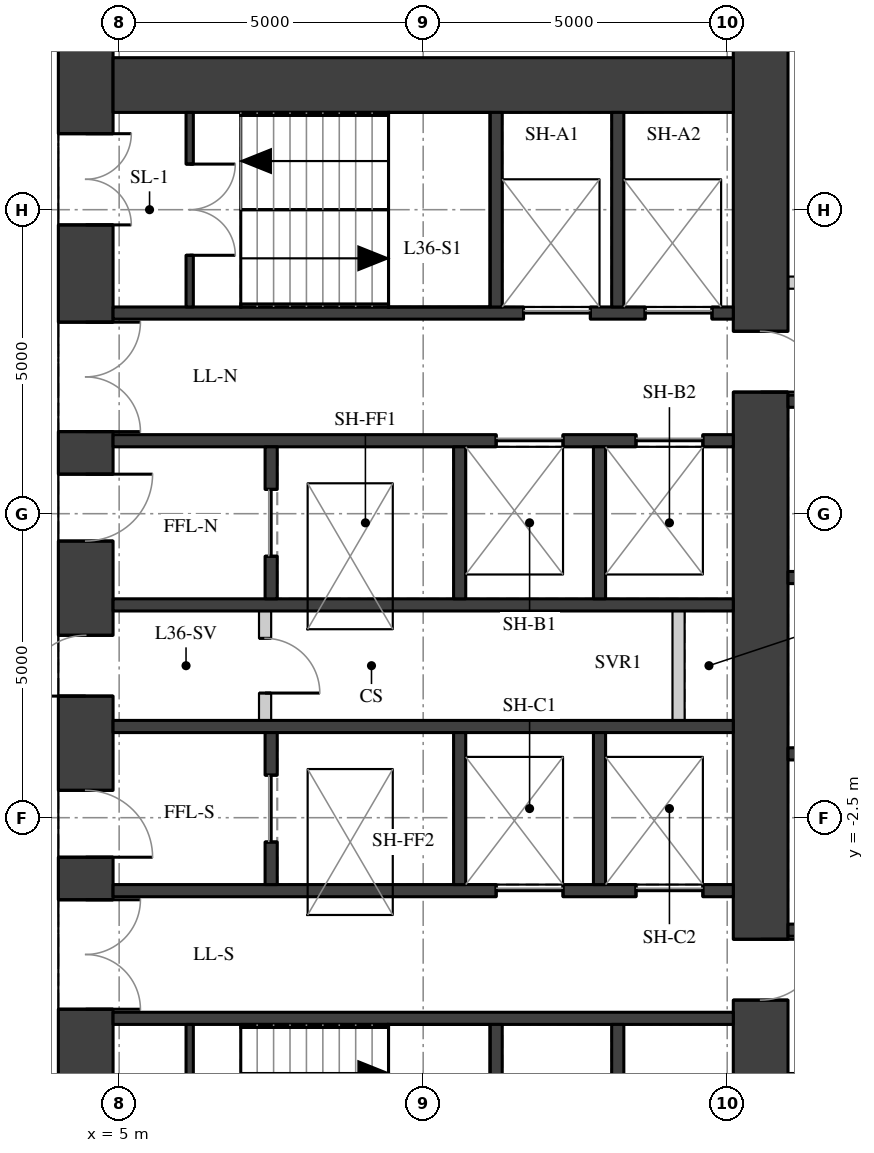
"""IFC4 building model, lengths in metres.
Left out: names, types, materials, properties, quantities, classifications, styles, units other than length and angle.
Written with IfcOpenShell. Run it as: python <this file> out.ifc"""

import sys

from ifc_helpers import new_model, si_unit, direction, frame, frame_2d, origin, place, context, subcontext, project, spatial, rectangle, extrude, element, fill, save


model = new_model("IFC4")
c1 = context("Model", 3, precision=1e-05, world=origin(), true_north=direction((0.0, 1.0)))
c2 = subcontext(c1, "Body", "Model", "MODEL_VIEW")
j1 = project(units=[si_unit("LENGTHUNIT", "METRE"), si_unit("PLANEANGLEUNIT", "RADIAN")], contexts=[c1])
p1 = place(None, origin())
s1 = spatial("IfcSite", under=j1, at=p1, CompositionType="ELEMENT")
p2 = place(p1, origin())
s2 = spatial("IfcBuilding", under=s1, at=p2, CompositionType="ELEMENT")
p3 = place(p2, frame((0.0, 0.0, 128.5)))
s3 = spatial("IfcBuildingStorey", under=s2, at=p3, CompositionType="ELEMENT", Elevation=128.5)
p4 = place(p3, frame((4.45, -11.1, 0.0), z_axis=(0.0, 0.0, 1.0), x_axis=(0.0, 1.0, 0.0)))
e1 = element("IfcWall", 1, at=p4, inside=s3, PredefinedType="SHEAR", context=c2, shape_type="SweptSolid", body=[
    extrude(rectangle(XDim=22.2, YDim=0.9, at=frame_2d((11.1, 0.0))), origin(), (0.0, 0.0, 1.0), 3.02),
])
p5 = place(p4, frame((2.35, 0.0, 0.0)))
e2 = element("IfcOpeningElement", 2, at=p5, cuts=e1, PredefinedType="OPENING", context=c2, shape_type="SweptSolid", body=[
    extrude(rectangle(XDim=1.5, YDim=2.1, at=frame_2d((0.75, 1.05))), frame((0.0, 0.46, 0.0), z_axis=(0.0, -1.0, 0.0), x_axis=(1.0, 0.0, 0.0)), (0.0, 0.0, 1.0), 0.92),
])
p6 = place(p4, frame((5.45, 0.0, 0.0)))
e3 = element("IfcOpeningElement", 3, at=p6, cuts=e1, PredefinedType="OPENING", context=c2, shape_type="SweptSolid", body=[
    extrude(rectangle(XDim=1.8, YDim=2.1, at=frame_2d((0.9, 1.05))), frame((0.0, 0.46, 0.0), z_axis=(0.0, -1.0, 0.0), x_axis=(1.0, 0.0, 0.0)), (0.0, 0.0, 1.0), 0.92),
])
p7 = place(p4, frame((7.95, 0.0, 0.0)))
e4 = element("IfcOpeningElement", 4, at=p7, cuts=e1, PredefinedType="OPENING", context=c2, shape_type="SweptSolid", body=[
    extrude(rectangle(XDim=1.1, YDim=2.1, at=frame_2d((0.55, 1.05))), frame((0.0, 0.46, 0.0), z_axis=(0.0, -1.0, 0.0), x_axis=(1.0, 0.0, 0.0)), (0.0, 0.0, 1.0), 0.92),
])
p8 = place(p4, frame((10.6, 0.0, 0.0)))
e5 = element("IfcOpeningElement", 5, at=p8, cuts=e1, PredefinedType="OPENING", context=c2, shape_type="SweptSolid", body=[
    extrude(rectangle(XDim=1.0, YDim=2.1, at=frame_2d((0.5, 1.05))), frame((0.0, 0.46, 0.0), z_axis=(0.0, -1.0, 0.0), x_axis=(1.0, 0.0, 0.0)), (0.0, 0.0, 1.0), 0.92),
])
p9 = place(p4, frame((13.15, 0.0, 0.0)))
e6 = element("IfcOpeningElement", 6, at=p9, cuts=e1, PredefinedType="OPENING", context=c2, shape_type="SweptSolid", body=[
    extrude(rectangle(XDim=1.1, YDim=2.1, at=frame_2d((0.55, 1.05))), frame((0.0, 0.46, 0.0), z_axis=(0.0, -1.0, 0.0), x_axis=(1.0, 0.0, 0.0)), (0.0, 0.0, 1.0), 0.92),
])
p10 = place(p4, frame((14.95, 0.0, 0.0)))
e7 = element("IfcOpeningElement", 7, at=p10, cuts=e1, PredefinedType="OPENING", context=c2, shape_type="SweptSolid", body=[
    extrude(rectangle(XDim=1.8, YDim=2.1, at=frame_2d((0.9, 1.05))), frame((0.0, 0.46, 0.0), z_axis=(0.0, -1.0, 0.0), x_axis=(1.0, 0.0, 0.0)), (0.0, 0.0, 1.0), 0.92),
])
p11 = place(p4, frame((18.35, 0.0, 0.0)))
e8 = element("IfcOpeningElement", 8, at=p11, cuts=e1, PredefinedType="OPENING", context=c2, shape_type="SweptSolid", body=[
    extrude(rectangle(XDim=1.5, YDim=2.1, at=frame_2d((0.75, 1.05))), frame((0.0, 0.46, 0.0), z_axis=(0.0, -1.0, 0.0), x_axis=(1.0, 0.0, 0.0)), (0.0, 0.0, 1.0), 0.92),
])
p12 = place(p3, frame((15.55, -11.1, 0.0), z_axis=(0.0, 0.0, 1.0), x_axis=(0.0, 1.0, 0.0)))
e9 = element("IfcWall", 9, at=p12, inside=s3, PredefinedType="SHEAR", context=c2, shape_type="SweptSolid", body=[
    extrude(rectangle(XDim=22.2, YDim=0.9, at=frame_2d((11.1, 0.0))), origin(), (0.0, 0.0, 1.0), 3.02),
])
p13 = place(p12, frame((15.6, 0.0, 0.0)))
e10 = element("IfcOpeningElement", 10, at=p13, cuts=e9, PredefinedType="OPENING", context=c2, shape_type="SweptSolid", body=[
    extrude(rectangle(XDim=1.0, YDim=2.1, at=frame_2d((0.5, 1.05))), frame((0.0, 0.46, 0.0), z_axis=(0.0, -1.0, 0.0), x_axis=(1.0, 0.0, 0.0)), (0.0, 0.0, 1.0), 0.92),
])
p14 = place(p12, frame((5.6, 0.0, 0.0)))
e11 = element("IfcOpeningElement", 11, at=p14, cuts=e9, PredefinedType="OPENING", context=c2, shape_type="SweptSolid", body=[
    extrude(rectangle(XDim=1.0, YDim=2.1, at=frame_2d((0.5, 1.05))), frame((0.0, 0.46, 0.0), z_axis=(0.0, -1.0, 0.0), x_axis=(1.0, 0.0, 0.0)), (0.0, 0.0, 1.0), 0.92),
])
p15 = place(p3, frame((4.9, 9.55, 0.0), z_axis=(0.0, 0.0, 1.0), x_axis=(1.0, 0.0, 0.0)))
e12 = element("IfcWall", 12, at=p15, inside=s3, PredefinedType="SHEAR", context=c2, shape_type="SweptSolid", body=[
    extrude(rectangle(XDim=10.2, YDim=0.9, at=frame_2d((5.1, 0.0))), origin(), (0.0, 0.0, 1.0), 3.02),
])
p16 = place(p3, frame((4.9, 5.8, 0.0), z_axis=(0.0, 0.0, 1.0), x_axis=(1.0, 0.0, 0.0)))
e13 = element("IfcWall", 13, at=p16, inside=s3, PredefinedType="SHEAR", context=c2, shape_type="SweptSolid", body=[
    extrude(rectangle(XDim=10.2, YDim=0.2, at=frame_2d((5.1, 0.0))), origin(), (0.0, 0.0, 1.0), 3.02),
])
p17 = place(p16, frame((6.75, 0.0, 0.0)))
e14 = element("IfcOpeningElement", 14, at=p17, cuts=e13, PredefinedType="OPENING", context=c2, shape_type="SweptSolid", body=[
    extrude(rectangle(XDim=1.1, YDim=2.1, at=frame_2d((0.55, 1.05))), frame((0.0, 0.11, 0.0), z_axis=(0.0, -1.0, 0.0), x_axis=(1.0, 0.0, 0.0)), (0.0, 0.0, 1.0), 0.22),
])
p18 = place(p16, frame((8.75, 0.0, 0.0)))
e15 = element("IfcOpeningElement", 15, at=p18, cuts=e13, PredefinedType="OPENING", context=c2, shape_type="SweptSolid", body=[
    extrude(rectangle(XDim=1.1, YDim=2.1, at=frame_2d((0.55, 1.05))), frame((0.0, 0.11, 0.0), z_axis=(0.0, -1.0, 0.0), x_axis=(1.0, 0.0, 0.0)), (0.0, 0.0, 1.0), 0.22),
])
p19 = place(p3, frame((4.9, 3.7, 0.0), z_axis=(0.0, 0.0, 1.0), x_axis=(1.0, 0.0, 0.0)))
e16 = element("IfcWall", 16, at=p19, inside=s3, PredefinedType="SHEAR", context=c2, shape_type="SweptSolid", body=[
    extrude(rectangle(XDim=10.2, YDim=0.2, at=frame_2d((5.1, 0.0))), origin(), (0.0, 0.0, 1.0), 3.02),
])
p20 = place(p19, frame((6.3, 0.0, 0.0)))
e17 = element("IfcOpeningElement", 17, at=p20, cuts=e16, PredefinedType="OPENING", context=c2, shape_type="SweptSolid", body=[
    extrude(rectangle(XDim=1.1, YDim=2.1, at=frame_2d((0.55, 1.05))), frame((0.0, 0.11, 0.0), z_axis=(0.0, -1.0, 0.0), x_axis=(1.0, 0.0, 0.0)), (0.0, 0.0, 1.0), 0.22),
])
p21 = place(p19, frame((8.6, 0.0, 0.0)))
e18 = element("IfcOpeningElement", 18, at=p21, cuts=e16, PredefinedType="OPENING", context=c2, shape_type="SweptSolid", body=[
    extrude(rectangle(XDim=1.1, YDim=2.1, at=frame_2d((0.55, 1.05))), frame((0.0, 0.11, 0.0), z_axis=(0.0, -1.0, 0.0), x_axis=(1.0, 0.0, 0.0)), (0.0, 0.0, 1.0), 0.22),
])
for number, where, z_axis, x_axis in (
    (19, (4.9, 1.0, 0.0), (0.0, 0.0, 1.0), (1.0, 0.0, 0.0)),
    (20, (4.9, -1.0, 0.0), (0.0, 0.0, 1.0), (1.0, 0.0, 0.0)),
):
    element("IfcWall", number, at=place(p3, frame(where, z_axis=z_axis, x_axis=x_axis)), inside=s3, PredefinedType="SHEAR", context=c2, shape_type="SweptSolid", body=[
        extrude(rectangle(XDim=10.2, YDim=0.2, at=frame_2d((5.1, 0.0))), origin(), (0.0, 0.0, 1.0), 3.02),
    ])
p22 = place(p3, frame((4.9, -3.7, 0.0), z_axis=(0.0, 0.0, 1.0), x_axis=(1.0, 0.0, 0.0)))
e21 = element("IfcWall", 21, at=p22, inside=s3, PredefinedType="SHEAR", context=c2, shape_type="SweptSolid", body=[
    extrude(rectangle(XDim=10.2, YDim=0.2, at=frame_2d((5.1, 0.0))), origin(), (0.0, 0.0, 1.0), 3.02),
])
p23 = place(p22, frame((6.3, 0.0, 0.0)))
e22 = element("IfcOpeningElement", 22, at=p23, cuts=e21, PredefinedType="OPENING", context=c2, shape_type="SweptSolid", body=[
    extrude(rectangle(XDim=1.1, YDim=2.1, at=frame_2d((0.55, 1.05))), frame((0.0, 0.11, 0.0), z_axis=(0.0, -1.0, 0.0), x_axis=(1.0, 0.0, 0.0)), (0.0, 0.0, 1.0), 0.22),
])
p24 = place(p22, frame((8.6, 0.0, 0.0)))
e23 = element("IfcOpeningElement", 23, at=p24, cuts=e21, PredefinedType="OPENING", context=c2, shape_type="SweptSolid", body=[
    extrude(rectangle(XDim=1.1, YDim=2.1, at=frame_2d((0.55, 1.05))), frame((0.0, 0.11, 0.0), z_axis=(0.0, -1.0, 0.0), x_axis=(1.0, 0.0, 0.0)), (0.0, 0.0, 1.0), 0.22),
])
p25 = place(p3, frame((4.9, -5.8, 0.0), z_axis=(0.0, 0.0, 1.0), x_axis=(1.0, 0.0, 0.0)))
e24 = element("IfcWall", 24, at=p25, inside=s3, PredefinedType="SHEAR", context=c2, shape_type="SweptSolid", body=[
    extrude(rectangle(XDim=10.2, YDim=0.2, at=frame_2d((5.1, 0.0))), origin(), (0.0, 0.0, 1.0), 3.02),
])
for number, where, z_axis, x_axis in (
    (25, (11.2, 5.9, 0.0), (0.0, 0.0, 1.0), (0.0, 1.0, 0.0)),
    (26, (11.2, -9.1, 0.0), (0.0, 0.0, 1.0), (0.0, 1.0, 0.0)),
    (27, (13.2, 5.9, 0.0), (0.0, 0.0, 1.0), (0.0, 1.0, 0.0)),
    (28, (13.2, -9.1, 0.0), (0.0, 0.0, 1.0), (0.0, 1.0, 0.0)),
):
    element("IfcWall", number, at=place(p3, frame(where, z_axis=z_axis, x_axis=x_axis)), inside=s3, PredefinedType="SHEAR", context=c2, shape_type="SweptSolid", body=[
        extrude(rectangle(XDim=3.2, YDim=0.2, at=frame_2d((1.6, 0.0))), origin(), (0.0, 0.0, 1.0), 3.02),
    ])
p26 = place(p3, frame((7.5, 1.1, 0.0), z_axis=(0.0, 0.0, 1.0), x_axis=(0.0, 1.0, 0.0)))
e29 = element("IfcWall", 29, at=p26, inside=s3, PredefinedType="SHEAR", context=c2, shape_type="SweptSolid", body=[
    extrude(rectangle(XDim=2.5, YDim=0.2, at=frame_2d((1.25, 0.0))), origin(), (0.0, 0.0, 1.0), 3.02),
])
p27 = place(p26, frame((0.7, 0.0, 0.0)))
e30 = element("IfcOpeningElement", 30, at=p27, cuts=e29, PredefinedType="OPENING", context=c2, shape_type="SweptSolid", body=[
    extrude(rectangle(XDim=1.1, YDim=2.1, at=frame_2d((0.55, 1.05))), frame((0.0, 0.11, 0.0), z_axis=(0.0, -1.0, 0.0), x_axis=(1.0, 0.0, 0.0)), (0.0, 0.0, 1.0), 0.22),
])
p28 = place(p3, frame((7.5, -3.6, 0.0), z_axis=(0.0, 0.0, 1.0), x_axis=(0.0, 1.0, 0.0)))
e31 = element("IfcWall", 31, at=p28, inside=s3, PredefinedType="SHEAR", context=c2, shape_type="SweptSolid", body=[
    extrude(rectangle(XDim=2.5, YDim=0.2, at=frame_2d((1.25, 0.0))), origin(), (0.0, 0.0, 1.0), 3.02),
])
p29 = place(p28, frame((0.7, 0.0, 0.0)))
e32 = element("IfcOpeningElement", 32, at=p29, cuts=e31, PredefinedType="OPENING", context=c2, shape_type="SweptSolid", body=[
    extrude(rectangle(XDim=1.1, YDim=2.1, at=frame_2d((0.55, 1.05))), frame((0.0, 0.11, 0.0), z_axis=(0.0, -1.0, 0.0), x_axis=(1.0, 0.0, 0.0)), (0.0, 0.0, 1.0), 0.22),
])
for number, where, z_axis, x_axis in (
    (33, (10.6, 1.1, 0.0), (0.0, 0.0, 1.0), (0.0, 1.0, 0.0)),
    (34, (10.6, -3.6, 0.0), (0.0, 0.0, 1.0), (0.0, 1.0, 0.0)),
    (35, (12.9, 1.1, 0.0), (0.0, 0.0, 1.0), (0.0, 1.0, 0.0)),
    (36, (12.9, -3.6, 0.0), (0.0, 0.0, 1.0), (0.0, 1.0, 0.0)),
):
    element("IfcWall", number, at=place(p3, frame(where, z_axis=z_axis, x_axis=x_axis)), inside=s3, PredefinedType="SHEAR", context=c2, shape_type="SweptSolid", body=[
        extrude(rectangle(XDim=2.5, YDim=0.2, at=frame_2d((1.25, 0.0))), origin(), (0.0, 0.0, 1.0), 3.02),
    ])
p30 = place(p3, frame((6.16, 5.9, 0.0), z_axis=(0.0, 0.0, 1.0), x_axis=(0.0, 1.0, 0.0)))
e37 = element("IfcWall", 37, at=p30, inside=s3, PredefinedType="SHEAR", context=c2, shape_type="SweptSolid", body=[
    extrude(rectangle(XDim=3.2, YDim=0.12, at=frame_2d((1.6, 0.0))), origin(), (0.0, 0.0, 1.0), 3.02),
])
p31 = place(p30, frame((0.85, 0.0, 0.0)))
e38 = element("IfcOpeningElement", 38, at=p31, cuts=e37, PredefinedType="OPENING", context=c2, shape_type="SweptSolid", body=[
    extrude(rectangle(XDim=1.5, YDim=2.1, at=frame_2d((0.75, 1.05))), frame((0.0, 0.07, 0.0), z_axis=(0.0, -1.0, 0.0), x_axis=(1.0, 0.0, 0.0)), (0.0, 0.0, 1.0), 0.14),
])
p32 = place(p3, frame((6.16, -9.1, 0.0), z_axis=(0.0, 0.0, 1.0), x_axis=(0.0, 1.0, 0.0)))
e39 = element("IfcWall", 39, at=p32, inside=s3, PredefinedType="SHEAR", context=c2, shape_type="SweptSolid", body=[
    extrude(rectangle(XDim=3.2, YDim=0.12, at=frame_2d((1.6, 0.0))), origin(), (0.0, 0.0, 1.0), 3.02),
])
p33 = place(p32, frame((0.85, 0.0, 0.0)))
e40 = element("IfcOpeningElement", 40, at=p33, cuts=e39, PredefinedType="OPENING", context=c2, shape_type="SweptSolid", body=[
    extrude(rectangle(XDim=1.5, YDim=2.1, at=frame_2d((0.75, 1.05))), frame((0.0, 0.07, 0.0), z_axis=(0.0, -1.0, 0.0), x_axis=(1.0, 0.0, 0.0)), (0.0, 0.0, 1.0), 0.14),
])
p34 = place(p3, frame((7.4, -0.9, 0.0), z_axis=(0.0, 0.0, 1.0), x_axis=(0.0, 1.0, 0.0)))
e41 = element("IfcWall", 41, at=p34, inside=s3, PredefinedType="PARTITIONING", context=c2, shape_type="SweptSolid", body=[
    extrude(rectangle(XDim=1.8, YDim=0.2, at=frame_2d((0.9, 0.0))), origin(), (0.0, 0.0, 1.0), 3.02),
])
p35 = place(p34, frame((0.45, 0.0, 0.0)))
e42 = element("IfcOpeningElement", 42, at=p35, cuts=e41, PredefinedType="OPENING", context=c2, shape_type="SweptSolid", body=[
    extrude(rectangle(XDim=0.9, YDim=2.1, at=frame_2d((0.45, 1.05))), frame((0.0, 0.11, 0.0), z_axis=(0.0, -1.0, 0.0), x_axis=(1.0, 0.0, 0.0)), (0.0, 0.0, 1.0), 0.22),
])
p36 = place(p3, frame((14.2, -0.9, 0.0), z_axis=(0.0, 0.0, 1.0), x_axis=(0.0, 1.0, 0.0)))
e43 = element("IfcWall", 43, at=p36, inside=s3, PredefinedType="PARTITIONING", context=c2, shape_type="SweptSolid", body=[
    extrude(rectangle(XDim=1.8, YDim=0.2, at=frame_2d((0.9, 0.0))), origin(), (0.0, 0.0, 1.0), 3.02),
])
for number, where, z_axis, x_axis in (
    (44, (16.0, -4.35, 0.0), (0.0, 0.0, 1.0), (1.0, 0.0, 0.0)),
    (45, (16.0, -1.45, 0.0), (0.0, 0.0, 1.0), (1.0, 0.0, 0.0)),
    (46, (16.0, 1.45, 0.0), (0.0, 0.0, 1.0), (1.0, 0.0, 0.0)),
    (47, (16.0, 4.35, 0.0), (0.0, 0.0, 1.0), (1.0, 0.0, 0.0)),
):
    element("IfcWall", number, at=place(p3, frame(where, z_axis=z_axis, x_axis=x_axis)), inside=s3, PredefinedType="SHEAR", context=c2, shape_type="SweptSolid", body=[
        extrude(rectangle(XDim=2.3, YDim=0.2, at=frame_2d((1.15, 0.0))), origin(), (0.0, 0.0, 1.0), 3.02),
    ])
p37 = place(p3, frame((16.0, 6.3, 0.0), z_axis=(0.0, 0.0, 1.0), x_axis=(1.0, 0.0, 0.0)))
e48 = element("IfcWall", 48, at=p37, inside=s3, PredefinedType="PARTITIONING", context=c2, shape_type="SweptSolid", body=[
    extrude(rectangle(XDim=2.3, YDim=0.2, at=frame_2d((1.15, 0.0))), origin(), (0.0, 0.0, 1.0), 3.02),
])
p38 = place(p37, frame((0.3, 0.0, 0.0)))
e49 = element("IfcOpeningElement", 49, at=p38, cuts=e48, PredefinedType="OPENING", context=c2, shape_type="SweptSolid", body=[
    extrude(rectangle(XDim=0.9, YDim=2.1, at=frame_2d((0.45, 1.05))), frame((0.0, 0.11, 0.0), z_axis=(0.0, -1.0, 0.0), x_axis=(1.0, 0.0, 0.0)), (0.0, 0.0, 1.0), 0.22),
])
p39 = place(p6, origin())
e50 = element("IfcDoor", 50, at=p39, inside=s3, OperationType="DOUBLE_DOOR_SINGLE_SWING", PredefinedType="DOOR", context=c2, shape_type="SweptSolid", body=[
    extrude(rectangle(XDim=1.8, YDim=2.1, at=frame_2d((0.9, 1.05))), frame((0.0, 0.025, 0.0), z_axis=(0.0, -1.0, 0.0), x_axis=(1.0, 0.0, 0.0)), (0.0, 0.0, 1.0), 0.05),
])
fill(e3, e50)
p40 = place(p7, origin())
e51 = element("IfcDoor", 51, at=p40, inside=s3, OperationType="SINGLE_SWING_RIGHT", PredefinedType="DOOR", context=c2, shape_type="SweptSolid", body=[
    extrude(rectangle(XDim=1.1, YDim=2.1, at=frame_2d((0.55, 1.05))), frame((0.0, 0.025, 0.0), z_axis=(0.0, -1.0, 0.0), x_axis=(1.0, 0.0, 0.0)), (0.0, 0.0, 1.0), 0.05),
])
fill(e4, e51)
p41 = place(p8, origin())
e52 = element("IfcDoor", 52, at=p41, inside=s3, OperationType="SINGLE_SWING_LEFT", PredefinedType="DOOR", context=c2, shape_type="SweptSolid", body=[
    extrude(rectangle(XDim=1.0, YDim=2.1, at=frame_2d((0.5, 1.05))), frame((0.0, 0.025, 0.0), z_axis=(0.0, -1.0, 0.0), x_axis=(1.0, 0.0, 0.0)), (0.0, 0.0, 1.0), 0.05),
])
fill(e5, e52)
p42 = place(p9, origin())
e53 = element("IfcDoor", 53, at=p42, inside=s3, OperationType="SINGLE_SWING_LEFT", PredefinedType="DOOR", context=c2, shape_type="SweptSolid", body=[
    extrude(rectangle(XDim=1.1, YDim=2.1, at=frame_2d((0.55, 1.05))), frame((0.0, 0.025, 0.0), z_axis=(0.0, -1.0, 0.0), x_axis=(1.0, 0.0, 0.0)), (0.0, 0.0, 1.0), 0.05),
])
fill(e6, e53)
p43 = place(p10, origin())
e54 = element("IfcDoor", 54, at=p43, inside=s3, OperationType="DOUBLE_DOOR_SINGLE_SWING", PredefinedType="DOOR", context=c2, shape_type="SweptSolid", body=[
    extrude(rectangle(XDim=1.8, YDim=2.1, at=frame_2d((0.9, 1.05))), frame((0.0, 0.025, 0.0), z_axis=(0.0, -1.0, 0.0), x_axis=(1.0, 0.0, 0.0)), (0.0, 0.0, 1.0), 0.05),
])
fill(e7, e54)
p44 = place(p11, origin())
e55 = element("IfcDoor", 55, at=p44, inside=s3, OperationType="DOUBLE_DOOR_SINGLE_SWING", PredefinedType="DOOR", context=c2, shape_type="SweptSolid", body=[
    extrude(rectangle(XDim=1.5, YDim=2.1, at=frame_2d((0.75, 1.05))), frame((0.0, 0.025, 0.0), z_axis=(0.0, -1.0, 0.0), x_axis=(1.0, 0.0, 0.0)), (0.0, 0.0, 1.0), 0.05),
])
fill(e8, e55)
p45 = place(p31, origin())
e56 = element("IfcDoor", 56, at=p45, inside=s3, OperationType="DOUBLE_DOOR_SINGLE_SWING", PredefinedType="DOOR", context=c2, shape_type="SweptSolid", body=[
    extrude(rectangle(XDim=1.5, YDim=2.1, at=frame_2d((0.75, 1.05))), frame((0.0, 0.025, 0.0), z_axis=(0.0, -1.0, 0.0), x_axis=(1.0, 0.0, 0.0)), (0.0, 0.0, 1.0), 0.05),
])
fill(e38, e56)
p46 = place(p17, origin())
e57 = element("IfcDoor", 57, at=p46, inside=s3, OperationType="DOUBLE_DOOR_SLIDING", PredefinedType="DOOR", context=c2, shape_type="SweptSolid", body=[
    extrude(rectangle(XDim=1.1, YDim=2.1, at=frame_2d((0.55, 1.05))), frame((0.0, 0.025, 0.0), z_axis=(0.0, -1.0, 0.0), x_axis=(1.0, 0.0, 0.0)), (0.0, 0.0, 1.0), 0.05),
])
fill(e14, e57)
p47 = place(p18, origin())
e58 = element("IfcDoor", 58, at=p47, inside=s3, OperationType="DOUBLE_DOOR_SLIDING", PredefinedType="DOOR", context=c2, shape_type="SweptSolid", body=[
    extrude(rectangle(XDim=1.1, YDim=2.1, at=frame_2d((0.55, 1.05))), frame((0.0, 0.025, 0.0), z_axis=(0.0, -1.0, 0.0), x_axis=(1.0, 0.0, 0.0)), (0.0, 0.0, 1.0), 0.05),
])
fill(e15, e58)
p48 = place(p20, origin())
e59 = element("IfcDoor", 59, at=p48, inside=s3, OperationType="DOUBLE_DOOR_SLIDING", PredefinedType="DOOR", context=c2, shape_type="SweptSolid", body=[
    extrude(rectangle(XDim=1.1, YDim=2.1, at=frame_2d((0.55, 1.05))), frame((0.0, 0.025, 0.0), z_axis=(0.0, -1.0, 0.0), x_axis=(1.0, 0.0, 0.0)), (0.0, 0.0, 1.0), 0.05),
])
fill(e17, e59)
p49 = place(p21, origin())
e60 = element("IfcDoor", 60, at=p49, inside=s3, OperationType="DOUBLE_DOOR_SLIDING", PredefinedType="DOOR", context=c2, shape_type="SweptSolid", body=[
    extrude(rectangle(XDim=1.1, YDim=2.1, at=frame_2d((0.55, 1.05))), frame((0.0, 0.025, 0.0), z_axis=(0.0, -1.0, 0.0), x_axis=(1.0, 0.0, 0.0)), (0.0, 0.0, 1.0), 0.05),
])
fill(e18, e60)
p50 = place(p23, origin())
e61 = element("IfcDoor", 61, at=p50, inside=s3, OperationType="DOUBLE_DOOR_SLIDING", PredefinedType="DOOR", context=c2, shape_type="SweptSolid", body=[
    extrude(rectangle(XDim=1.1, YDim=2.1, at=frame_2d((0.55, 1.05))), frame((0.0, 0.025, 0.0), z_axis=(0.0, -1.0, 0.0), x_axis=(1.0, 0.0, 0.0)), (0.0, 0.0, 1.0), 0.05),
])
fill(e22, e61)
p51 = place(p24, origin())
e62 = element("IfcDoor", 62, at=p51, inside=s3, OperationType="DOUBLE_DOOR_SLIDING", PredefinedType="DOOR", context=c2, shape_type="SweptSolid", body=[
    extrude(rectangle(XDim=1.1, YDim=2.1, at=frame_2d((0.55, 1.05))), frame((0.0, 0.025, 0.0), z_axis=(0.0, -1.0, 0.0), x_axis=(1.0, 0.0, 0.0)), (0.0, 0.0, 1.0), 0.05),
])
fill(e23, e62)
p52 = place(p27, origin())
e63 = element("IfcDoor", 63, at=p52, inside=s3, OperationType="DOUBLE_DOOR_SLIDING", PredefinedType="DOOR", context=c2, shape_type="SweptSolid", body=[
    extrude(rectangle(XDim=1.1, YDim=2.1, at=frame_2d((0.55, 1.05))), frame((0.0, 0.025, 0.0), z_axis=(0.0, -1.0, 0.0), x_axis=(1.0, 0.0, 0.0)), (0.0, 0.0, 1.0), 0.05),
])
fill(e30, e63)
p53 = place(p29, origin())
e64 = element("IfcDoor", 64, at=p53, inside=s3, OperationType="DOUBLE_DOOR_SLIDING", PredefinedType="DOOR", context=c2, shape_type="SweptSolid", body=[
    extrude(rectangle(XDim=1.1, YDim=2.1, at=frame_2d((0.55, 1.05))), frame((0.0, 0.025, 0.0), z_axis=(0.0, -1.0, 0.0), x_axis=(1.0, 0.0, 0.0)), (0.0, 0.0, 1.0), 0.05),
])
fill(e32, e64)
p54 = place(p35, origin())
e65 = element("IfcDoor", 65, at=p54, inside=s3, OperationType="SINGLE_SWING_RIGHT", PredefinedType="DOOR", context=c2, shape_type="SweptSolid", body=[
    extrude(rectangle(XDim=0.9, YDim=2.1, at=frame_2d((0.45, 1.05))), frame((0.0, 0.025, 0.0), z_axis=(0.0, -1.0, 0.0), x_axis=(1.0, 0.0, 0.0)), (0.0, 0.0, 1.0), 0.05),
])
fill(e42, e65)
p55 = place(p13, origin())
e66 = element("IfcDoor", 66, at=p55, inside=s3, OperationType="SINGLE_SWING_RIGHT", PredefinedType="DOOR", context=c2, shape_type="SweptSolid", body=[
    extrude(rectangle(XDim=1.0, YDim=2.1, at=frame_2d((0.5, 1.05))), frame((0.0, 0.025, 0.0), z_axis=(0.0, -1.0, 0.0), x_axis=(1.0, 0.0, 0.0)), (0.0, 0.0, 1.0), 0.05),
])
fill(e10, e66)
p56 = place(p14, origin())
e67 = element("IfcDoor", 67, at=p56, inside=s3, OperationType="SINGLE_SWING_LEFT", PredefinedType="DOOR", context=c2, shape_type="SweptSolid", body=[
    extrude(rectangle(XDim=1.0, YDim=2.1, at=frame_2d((0.5, 1.05))), frame((0.0, 0.025, 0.0), z_axis=(0.0, -1.0, 0.0), x_axis=(1.0, 0.0, 0.0)), (0.0, 0.0, 1.0), 0.05),
])
fill(e11, e67)
save(model, sys.argv[1])
